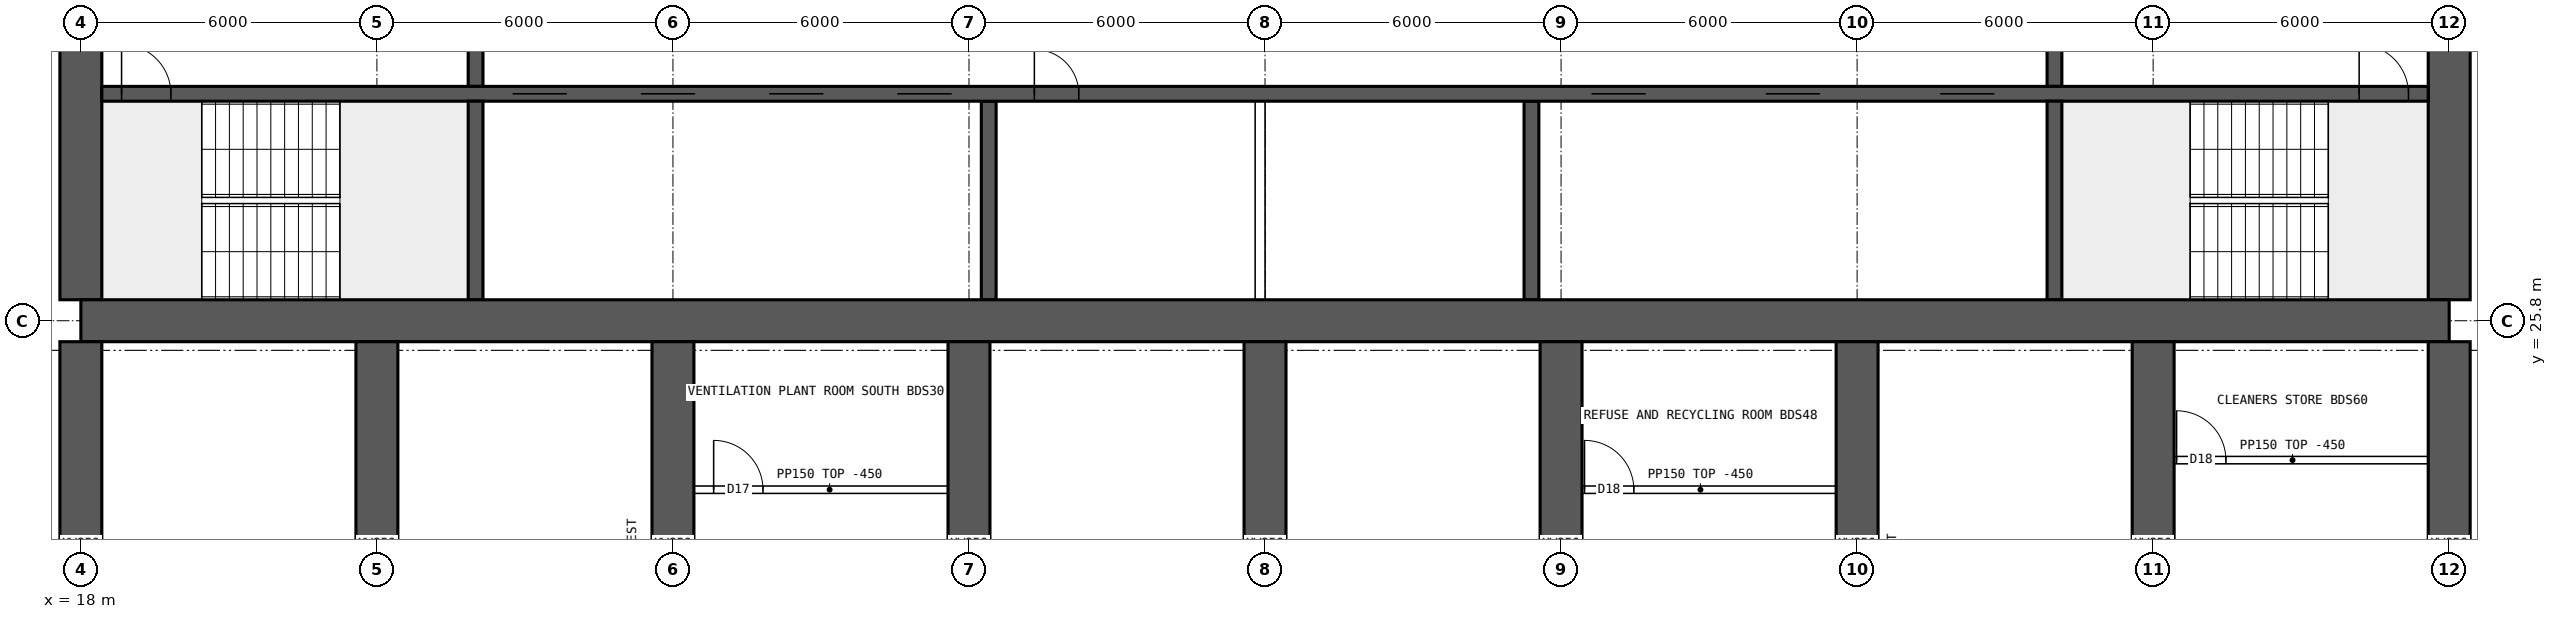
"""IFC4 building model, lengths in metres.
Left out: names, types, materials, properties, quantities, classifications, styles, units other than length and angle.
Written with IfcOpenShell. Run it as: python <this file> out.ifc"""

import sys

from ifc_helpers import new_model, si_unit, direction, frame, frame_2d, origin, place, context, subcontext, project, spatial, rectangle, extrude, element, fill, save


model = new_model("IFC4")
c1 = context("Model", 3, precision=1e-05, world=origin(), true_north=direction((0.0, 1.0)))
c2 = subcontext(c1, "Body", "Model", "MODEL_VIEW")
j1 = project(units=[si_unit("LENGTHUNIT", "METRE"), si_unit("PLANEANGLEUNIT", "RADIAN")], contexts=[c1])
p1 = place(None, origin())
s1 = spatial("IfcSite", under=j1, at=p1, CompositionType="ELEMENT")
p2 = place(p1, origin())
s2 = spatial("IfcBuilding", under=s1, at=p2, CompositionType="ELEMENT")
p3 = place(p2, frame((0.0, 0.0, 159.85)))
s3 = spatial("IfcBuildingStorey", under=s2, at=p3, CompositionType="ELEMENT", Elevation=159.85)
p4 = place(p3, frame((18.0, 25.8, 0.0), z_axis=(0.0, 0.0, 1.0), x_axis=(1.0, 0.0, 0.0)))
e1 = element("IfcWall", 1, at=p4, inside=s3, PredefinedType="SHEAR", context=c2, shape_type="SweptSolid", body=[
    extrude(rectangle(XDim=48.0, YDim=0.85, at=frame_2d((24.0, 0.0))), origin(), (0.0, 0.0, 1.0), 3.75),
])
p5 = place(p3, frame((18.0, 26.225, 0.0), z_axis=(0.0, 0.0, 1.0), x_axis=(0.0, 1.0, 0.0)))
e2 = element("IfcWall", 2, at=p5, inside=s3, PredefinedType="SHEAR", context=c2, shape_type="SweptSolid", body=[
    extrude(rectangle(XDim=11.55, YDim=0.85, at=frame_2d((5.775, 0.0))), origin(), (0.0, 0.0, 1.0), 3.75),
])
p6 = place(p5, frame((5.075, 0.0, 0.0)))
e3 = element("IfcOpeningElement", 3, at=p6, cuts=e2, PredefinedType="OPENING", context=c2, shape_type="SweptSolid", body=[
    extrude(rectangle(XDim=1.2, YDim=2.1, at=frame_2d((0.6, 1.05))), frame((0.0, 0.435, 0.0), z_axis=(0.0, -1.0, 0.0), x_axis=(1.0, 0.0, 0.0)), (0.0, 0.0, 1.0), 0.87),
])
p7 = place(p3, frame((66.0, 26.225, 0.0), z_axis=(0.0, 0.0, 1.0), x_axis=(0.0, 1.0, 0.0)))
e4 = element("IfcWall", 4, at=p7, inside=s3, PredefinedType="SHEAR", context=c2, shape_type="SweptSolid", body=[
    extrude(rectangle(XDim=11.55, YDim=0.85, at=frame_2d((5.775, 0.0))), origin(), (0.0, 0.0, 1.0), 3.75),
])
p8 = place(p7, frame((5.075, 0.0, 0.0)))
e5 = element("IfcOpeningElement", 5, at=p8, cuts=e4, PredefinedType="OPENING", context=c2, shape_type="SweptSolid", body=[
    extrude(rectangle(XDim=1.2, YDim=2.1, at=frame_2d((0.6, 1.05))), frame((0.0, 0.435, 0.0), z_axis=(0.0, -1.0, 0.0), x_axis=(1.0, 0.0, 0.0)), (0.0, 0.0, 1.0), 0.87),
])
p9 = place(p3, frame((18.425, 30.4, 0.0), z_axis=(0.0, 0.0, 1.0), x_axis=(1.0, 0.0, 0.0)))
e6 = element("IfcWall", 6, at=p9, inside=s3, PredefinedType="SHEAR", context=c2, shape_type="SweptSolid", body=[
    extrude(rectangle(XDim=47.15, YDim=0.3, at=frame_2d((23.575, 0.0))), origin(), (0.0, 0.0, 1.0), 3.75),
])
p10 = place(p9, frame((0.4, 0.0, 0.0)))
e7 = element("IfcOpeningElement", 7, at=p10, cuts=e6, PredefinedType="OPENING", context=c2, shape_type="SweptSolid", body=[
    extrude(rectangle(XDim=1.0, YDim=2.1, at=frame_2d((0.5, 1.05))), frame((0.0, 0.16, 0.0), z_axis=(0.0, -1.0, 0.0), x_axis=(1.0, 0.0, 0.0)), (0.0, 0.0, 1.0), 0.32),
])
p11 = place(p9, frame((45.75, 0.0, 0.0)))
e8 = element("IfcOpeningElement", 8, at=p11, cuts=e6, PredefinedType="OPENING", context=c2, shape_type="SweptSolid", body=[
    extrude(rectangle(XDim=1.0, YDim=2.1, at=frame_2d((0.5, 1.05))), frame((0.0, 0.16, 0.0), z_axis=(0.0, -1.0, 0.0), x_axis=(1.0, 0.0, 0.0)), (0.0, 0.0, 1.0), 0.32),
])
p12 = place(p9, frame((8.325, 0.0, 0.0)))
e9 = element("IfcOpeningElement", 9, at=p12, cuts=e6, PredefinedType="OPENING", context=c2, shape_type="SweptSolid", body=[
    extrude(rectangle(XDim=1.1, YDim=2.1, at=frame_2d((0.55, 1.05))), frame((0.0, 0.16, 0.0), z_axis=(0.0, -1.0, 0.0), x_axis=(1.0, 0.0, 0.0)), (0.0, 0.0, 1.0), 0.32),
])
p13 = place(p9, frame((10.925, 0.0, 0.0)))
e10 = element("IfcOpeningElement", 10, at=p13, cuts=e6, PredefinedType="OPENING", context=c2, shape_type="SweptSolid", body=[
    extrude(rectangle(XDim=1.1, YDim=2.1, at=frame_2d((0.55, 1.05))), frame((0.0, 0.16, 0.0), z_axis=(0.0, -1.0, 0.0), x_axis=(1.0, 0.0, 0.0)), (0.0, 0.0, 1.0), 0.32),
])
p14 = place(p9, frame((13.525, 0.0, 0.0)))
e11 = element("IfcOpeningElement", 11, at=p14, cuts=e6, PredefinedType="OPENING", context=c2, shape_type="SweptSolid", body=[
    extrude(rectangle(XDim=1.1, YDim=2.1, at=frame_2d((0.55, 1.05))), frame((0.0, 0.16, 0.0), z_axis=(0.0, -1.0, 0.0), x_axis=(1.0, 0.0, 0.0)), (0.0, 0.0, 1.0), 0.32),
])
p15 = place(p9, frame((16.125, 0.0, 0.0)))
e12 = element("IfcOpeningElement", 12, at=p15, cuts=e6, PredefinedType="OPENING", context=c2, shape_type="SweptSolid", body=[
    extrude(rectangle(XDim=1.1, YDim=2.1, at=frame_2d((0.55, 1.05))), frame((0.0, 0.16, 0.0), z_axis=(0.0, -1.0, 0.0), x_axis=(1.0, 0.0, 0.0)), (0.0, 0.0, 1.0), 0.32),
])
p16 = place(p9, frame((18.9, 0.0, 0.0)))
e13 = element("IfcOpeningElement", 13, at=p16, cuts=e6, PredefinedType="OPENING", context=c2, shape_type="SweptSolid", body=[
    extrude(rectangle(XDim=0.9, YDim=2.1, at=frame_2d((0.45, 1.05))), frame((0.0, 0.16, 0.0), z_axis=(0.0, -1.0, 0.0), x_axis=(1.0, 0.0, 0.0)), (0.0, 0.0, 1.0), 0.32),
])
p17 = place(p9, frame((30.192, 0.0, 0.0)))
e14 = element("IfcOpeningElement", 14, at=p17, cuts=e6, PredefinedType="OPENING", context=c2, shape_type="SweptSolid", body=[
    extrude(rectangle(XDim=1.1, YDim=2.1, at=frame_2d((0.55, 1.05))), frame((0.0, 0.16, 0.0), z_axis=(0.0, -1.0, 0.0), x_axis=(1.0, 0.0, 0.0)), (0.0, 0.0, 1.0), 0.32),
])
p18 = place(p9, frame((33.725, 0.0, 0.0)))
e15 = element("IfcOpeningElement", 15, at=p18, cuts=e6, PredefinedType="OPENING", context=c2, shape_type="SweptSolid", body=[
    extrude(rectangle(XDim=1.1, YDim=2.1, at=frame_2d((0.55, 1.05))), frame((0.0, 0.16, 0.0), z_axis=(0.0, -1.0, 0.0), x_axis=(1.0, 0.0, 0.0)), (0.0, 0.0, 1.0), 0.32),
])
p19 = place(p9, frame((37.258, 0.0, 0.0)))
e16 = element("IfcOpeningElement", 16, at=p19, cuts=e6, PredefinedType="OPENING", context=c2, shape_type="SweptSolid", body=[
    extrude(rectangle(XDim=1.1, YDim=2.1, at=frame_2d((0.55, 1.05))), frame((0.0, 0.16, 0.0), z_axis=(0.0, -1.0, 0.0), x_axis=(1.0, 0.0, 0.0)), (0.0, 0.0, 1.0), 0.32),
])
for number, where, z_axis, x_axis in (
    (17, (26.0, 26.225, 0.0), (0.0, 0.0, 1.0), (0.0, 1.0, 0.0)),
    (18, (58.0, 26.225, 0.0), (0.0, 0.0, 1.0), (0.0, 1.0, 0.0)),
):
    element("IfcWall", number, at=place(p3, frame(where, z_axis=z_axis, x_axis=x_axis)), inside=s3, PredefinedType="SHEAR", context=c2, shape_type="SweptSolid", body=[
        extrude(rectangle(XDim=4.025, YDim=0.3, at=frame_2d((2.012, 0.0))), origin(), (0.0, 0.0, 1.0), 3.75),
    ])
p20 = place(p3, frame((26.0, 30.55, 0.0), z_axis=(0.0, 0.0, 1.0), x_axis=(0.0, 1.0, 0.0)))
e19 = element("IfcWall", 19, at=p20, inside=s3, PredefinedType="SHEAR", context=c2, shape_type="SweptSolid", body=[
    extrude(rectangle(XDim=3.9, YDim=0.3, at=frame_2d((1.95, 0.0))), origin(), (0.0, 0.0, 1.0), 3.75),
])
p21 = place(p20, frame((1.4, 0.0, 0.0)))
e20 = element("IfcOpeningElement", 20, at=p21, cuts=e19, PredefinedType="OPENING", context=c2, shape_type="SweptSolid", body=[
    extrude(rectangle(XDim=1.2, YDim=2.1, at=frame_2d((0.6, 1.05))), frame((0.0, 0.16, 0.0), z_axis=(0.0, -1.0, 0.0), x_axis=(1.0, 0.0, 0.0)), (0.0, 0.0, 1.0), 0.32),
])
p22 = place(p3, frame((58.0, 30.55, 0.0), z_axis=(0.0, 0.0, 1.0), x_axis=(0.0, 1.0, 0.0)))
e21 = element("IfcWall", 21, at=p22, inside=s3, PredefinedType="SHEAR", context=c2, shape_type="SweptSolid", body=[
    extrude(rectangle(XDim=3.9, YDim=0.3, at=frame_2d((1.95, 0.0))), origin(), (0.0, 0.0, 1.0), 3.75),
])
p23 = place(p22, frame((1.4, 0.0, 0.0)))
e22 = element("IfcOpeningElement", 22, at=p23, cuts=e21, PredefinedType="OPENING", context=c2, shape_type="SweptSolid", body=[
    extrude(rectangle(XDim=1.2, YDim=2.1, at=frame_2d((0.6, 1.05))), frame((0.0, 0.16, 0.0), z_axis=(0.0, -1.0, 0.0), x_axis=(1.0, 0.0, 0.0)), (0.0, 0.0, 1.0), 0.32),
])
for number, where, z_axis, x_axis in (
    (23, (36.4, 26.225, 0.0), (0.0, 0.0, 1.0), (0.0, 1.0, 0.0)),
    (24, (47.4, 26.225, 0.0), (0.0, 0.0, 1.0), (0.0, 1.0, 0.0)),
):
    element("IfcWall", number, at=place(p3, frame(where, z_axis=z_axis, x_axis=x_axis)), inside=s3, PredefinedType="SHEAR", context=c2, shape_type="SweptSolid", body=[
        extrude(rectangle(XDim=4.025, YDim=0.3, at=frame_2d((2.012, 0.0))), origin(), (0.0, 0.0, 1.0), 3.75),
    ])
for number, where, z_axis, x_axis in (
    (25, (18.0, 17.2, 0.0), (0.0, 0.0, 1.0), (0.0, 1.0, 0.0)),
    (26, (24.0, 17.2, 0.0), (0.0, 0.0, 1.0), (0.0, 1.0, 0.0)),
    (27, (30.0, 17.2, 0.0), (0.0, 0.0, 1.0), (0.0, 1.0, 0.0)),
    (28, (36.0, 17.2, 0.0), (0.0, 0.0, 1.0), (0.0, 1.0, 0.0)),
    (29, (42.0, 17.2, 0.0), (0.0, 0.0, 1.0), (0.0, 1.0, 0.0)),
    (30, (48.0, 17.2, 0.0), (0.0, 0.0, 1.0), (0.0, 1.0, 0.0)),
    (31, (54.0, 17.2, 0.0), (0.0, 0.0, 1.0), (0.0, 1.0, 0.0)),
    (32, (60.0, 17.2, 0.0), (0.0, 0.0, 1.0), (0.0, 1.0, 0.0)),
    (33, (66.0, 17.2, 0.0), (0.0, 0.0, 1.0), (0.0, 1.0, 0.0)),
):
    element("IfcWall", number, at=place(p3, frame(where, z_axis=z_axis, x_axis=x_axis)), inside=s3, PredefinedType="SHEAR", context=c2, shape_type="SweptSolid", body=[
        extrude(rectangle(XDim=8.175, YDim=0.85, at=frame_2d((4.087, 0.0))), origin(), (0.0, 0.0, 1.0), 3.75),
    ])
p24 = place(p3, frame((41.9, 26.225, 0.0), z_axis=(0.0, 0.0, 1.0), x_axis=(0.0, 1.0, 0.0)))
e34 = element("IfcWall", 34, at=p24, inside=s3, PredefinedType="SOLIDWALL", context=c2, shape_type="SweptSolid", body=[
    extrude(rectangle(XDim=4.025, YDim=0.2, at=frame_2d((2.012, 0.0))), origin(), (0.0, 0.0, 1.0), 3.3),
])
p25 = place(p3, frame((30.425, 22.375, 0.0), z_axis=(0.0, 0.0, 1.0), x_axis=(1.0, 0.0, 0.0)))
e35 = element("IfcWall", 35, at=p25, inside=s3, PredefinedType="PARTITIONING", context=c2, shape_type="SweptSolid", body=[
    extrude(rectangle(XDim=5.5, YDim=0.15, at=frame_2d((2.75, 0.0))), origin(), (0.0, 0.0, 1.0), 3.3),
])
p26 = place(p25, frame((0.4, 0.0, 0.0)))
e36 = element("IfcOpeningElement", 36, at=p26, cuts=e35, PredefinedType="OPENING", context=c2, shape_type="SweptSolid", body=[
    extrude(rectangle(XDim=1.0, YDim=2.1, at=frame_2d((0.5, 1.05))), frame((0.0, 0.085, 0.0), z_axis=(0.0, -1.0, 0.0), x_axis=(1.0, 0.0, 0.0)), (0.0, 0.0, 1.0), 0.17),
])
p27 = place(p3, frame((48.075, 22.375, 0.0), z_axis=(0.0, 0.0, 1.0), x_axis=(1.0, 0.0, 0.0)))
e37 = element("IfcWall", 37, at=p27, inside=s3, PredefinedType="PARTITIONING", context=c2, shape_type="SweptSolid", body=[
    extrude(rectangle(XDim=5.5, YDim=0.15, at=frame_2d((2.75, 0.0))), origin(), (0.0, 0.0, 1.0), 3.3),
])
p28 = place(p27, frame((0.4, 0.0, 0.0)))
e38 = element("IfcOpeningElement", 38, at=p28, cuts=e37, PredefinedType="OPENING", context=c2, shape_type="SweptSolid", body=[
    extrude(rectangle(XDim=1.0, YDim=2.1, at=frame_2d((0.5, 1.05))), frame((0.0, 0.085, 0.0), z_axis=(0.0, -1.0, 0.0), x_axis=(1.0, 0.0, 0.0)), (0.0, 0.0, 1.0), 0.17),
])
p29 = place(p3, frame((60.075, 22.975, 0.0), z_axis=(0.0, 0.0, 1.0), x_axis=(1.0, 0.0, 0.0)))
e39 = element("IfcWall", 39, at=p29, inside=s3, PredefinedType="PARTITIONING", context=c2, shape_type="SweptSolid", body=[
    extrude(rectangle(XDim=5.5, YDim=0.15, at=frame_2d((2.75, 0.0))), origin(), (0.0, 0.0, 1.0), 3.3),
])
p30 = place(p29, frame((0.4, 0.0, 0.0)))
e40 = element("IfcOpeningElement", 40, at=p30, cuts=e39, PredefinedType="OPENING", context=c2, shape_type="SweptSolid", body=[
    extrude(rectangle(XDim=1.0, YDim=2.1, at=frame_2d((0.5, 1.05))), frame((0.0, 0.085, 0.0), z_axis=(0.0, -1.0, 0.0), x_axis=(1.0, 0.0, 0.0)), (0.0, 0.0, 1.0), 0.17),
])
p31 = place(p10, origin())
e41 = element("IfcDoor", 41, at=p31, inside=s3, OperationType="SINGLE_SWING_LEFT", PredefinedType="DOOR", context=c2, shape_type="SweptSolid", body=[
    extrude(rectangle(XDim=1.0, YDim=2.1, at=frame_2d((0.5, 1.05))), frame((0.0, 0.025, 0.0), z_axis=(0.0, -1.0, 0.0), x_axis=(1.0, 0.0, 0.0)), (0.0, 0.0, 1.0), 0.05),
])
fill(e7, e41)
p32 = place(p11, origin())
e42 = element("IfcDoor", 42, at=p32, inside=s3, OperationType="SINGLE_SWING_LEFT", PredefinedType="DOOR", context=c2, shape_type="SweptSolid", body=[
    extrude(rectangle(XDim=1.0, YDim=2.1, at=frame_2d((0.5, 1.05))), frame((0.0, 0.025, 0.0), z_axis=(0.0, -1.0, 0.0), x_axis=(1.0, 0.0, 0.0)), (0.0, 0.0, 1.0), 0.05),
])
fill(e8, e42)
p33 = place(p12, origin())
e43 = element("IfcDoor", 43, at=p33, inside=s3, OperationType="DOUBLE_DOOR_SLIDING", PredefinedType="DOOR", context=c2, shape_type="SweptSolid", body=[
    extrude(rectangle(XDim=1.1, YDim=2.1, at=frame_2d((0.55, 1.05))), frame((0.0, 0.025, 0.0), z_axis=(0.0, -1.0, 0.0), x_axis=(1.0, 0.0, 0.0)), (0.0, 0.0, 1.0), 0.05),
])
fill(e9, e43)
p34 = place(p13, origin())
e44 = element("IfcDoor", 44, at=p34, inside=s3, OperationType="DOUBLE_DOOR_SLIDING", PredefinedType="DOOR", context=c2, shape_type="SweptSolid", body=[
    extrude(rectangle(XDim=1.1, YDim=2.1, at=frame_2d((0.55, 1.05))), frame((0.0, 0.025, 0.0), z_axis=(0.0, -1.0, 0.0), x_axis=(1.0, 0.0, 0.0)), (0.0, 0.0, 1.0), 0.05),
])
fill(e10, e44)
p35 = place(p14, origin())
e45 = element("IfcDoor", 45, at=p35, inside=s3, OperationType="DOUBLE_DOOR_SLIDING", PredefinedType="DOOR", context=c2, shape_type="SweptSolid", body=[
    extrude(rectangle(XDim=1.1, YDim=2.1, at=frame_2d((0.55, 1.05))), frame((0.0, 0.025, 0.0), z_axis=(0.0, -1.0, 0.0), x_axis=(1.0, 0.0, 0.0)), (0.0, 0.0, 1.0), 0.05),
])
fill(e11, e45)
p36 = place(p15, origin())
e46 = element("IfcDoor", 46, at=p36, inside=s3, OperationType="DOUBLE_DOOR_SLIDING", PredefinedType="DOOR", context=c2, shape_type="SweptSolid", body=[
    extrude(rectangle(XDim=1.1, YDim=2.1, at=frame_2d((0.55, 1.05))), frame((0.0, 0.025, 0.0), z_axis=(0.0, -1.0, 0.0), x_axis=(1.0, 0.0, 0.0)), (0.0, 0.0, 1.0), 0.05),
])
fill(e12, e46)
p37 = place(p16, origin())
e47 = element("IfcDoor", 47, at=p37, inside=s3, OperationType="SINGLE_SWING_LEFT", PredefinedType="DOOR", context=c2, shape_type="SweptSolid", body=[
    extrude(rectangle(XDim=0.9, YDim=2.1, at=frame_2d((0.45, 1.05))), frame((0.0, 0.025, 0.0), z_axis=(0.0, -1.0, 0.0), x_axis=(1.0, 0.0, 0.0)), (0.0, 0.0, 1.0), 0.05),
])
fill(e13, e47)
p38 = place(p17, origin())
e48 = element("IfcDoor", 48, at=p38, inside=s3, OperationType="DOUBLE_DOOR_SLIDING", PredefinedType="DOOR", context=c2, shape_type="SweptSolid", body=[
    extrude(rectangle(XDim=1.1, YDim=2.1, at=frame_2d((0.55, 1.05))), frame((0.0, 0.025, 0.0), z_axis=(0.0, -1.0, 0.0), x_axis=(1.0, 0.0, 0.0)), (0.0, 0.0, 1.0), 0.05),
])
fill(e14, e48)
p39 = place(p18, origin())
e49 = element("IfcDoor", 49, at=p39, inside=s3, OperationType="DOUBLE_DOOR_SLIDING", PredefinedType="DOOR", context=c2, shape_type="SweptSolid", body=[
    extrude(rectangle(XDim=1.1, YDim=2.1, at=frame_2d((0.55, 1.05))), frame((0.0, 0.025, 0.0), z_axis=(0.0, -1.0, 0.0), x_axis=(1.0, 0.0, 0.0)), (0.0, 0.0, 1.0), 0.05),
])
fill(e15, e49)
p40 = place(p19, origin())
e50 = element("IfcDoor", 50, at=p40, inside=s3, OperationType="DOUBLE_DOOR_SLIDING", PredefinedType="DOOR", context=c2, shape_type="SweptSolid", body=[
    extrude(rectangle(XDim=1.1, YDim=2.1, at=frame_2d((0.55, 1.05))), frame((0.0, 0.025, 0.0), z_axis=(0.0, -1.0, 0.0), x_axis=(1.0, 0.0, 0.0)), (0.0, 0.0, 1.0), 0.05),
])
fill(e16, e50)
p41 = place(p26, origin())
e51 = element("IfcDoor", 51, at=p41, inside=s3, OperationType="SINGLE_SWING_LEFT", PredefinedType="DOOR", context=c2, shape_type="SweptSolid", body=[
    extrude(rectangle(XDim=1.0, YDim=2.1, at=frame_2d((0.5, 1.05))), frame((0.0, 0.025, 0.0), z_axis=(0.0, -1.0, 0.0), x_axis=(1.0, 0.0, 0.0)), (0.0, 0.0, 1.0), 0.05),
])
fill(e36, e51)
p42 = place(p28, origin())
e52 = element("IfcDoor", 52, at=p42, inside=s3, OperationType="SINGLE_SWING_LEFT", PredefinedType="DOOR", context=c2, shape_type="SweptSolid", body=[
    extrude(rectangle(XDim=1.0, YDim=2.1, at=frame_2d((0.5, 1.05))), frame((0.0, 0.025, 0.0), z_axis=(0.0, -1.0, 0.0), x_axis=(1.0, 0.0, 0.0)), (0.0, 0.0, 1.0), 0.05),
])
fill(e38, e52)
p43 = place(p30, origin())
e53 = element("IfcDoor", 53, at=p43, inside=s3, OperationType="SINGLE_SWING_LEFT", PredefinedType="DOOR", context=c2, shape_type="SweptSolid", body=[
    extrude(rectangle(XDim=1.0, YDim=2.1, at=frame_2d((0.5, 1.05))), frame((0.0, 0.025, 0.0), z_axis=(0.0, -1.0, 0.0), x_axis=(1.0, 0.0, 0.0)), (0.0, 0.0, 1.0), 0.05),
])
fill(e40, e53)
save(model, sys.argv[1])
